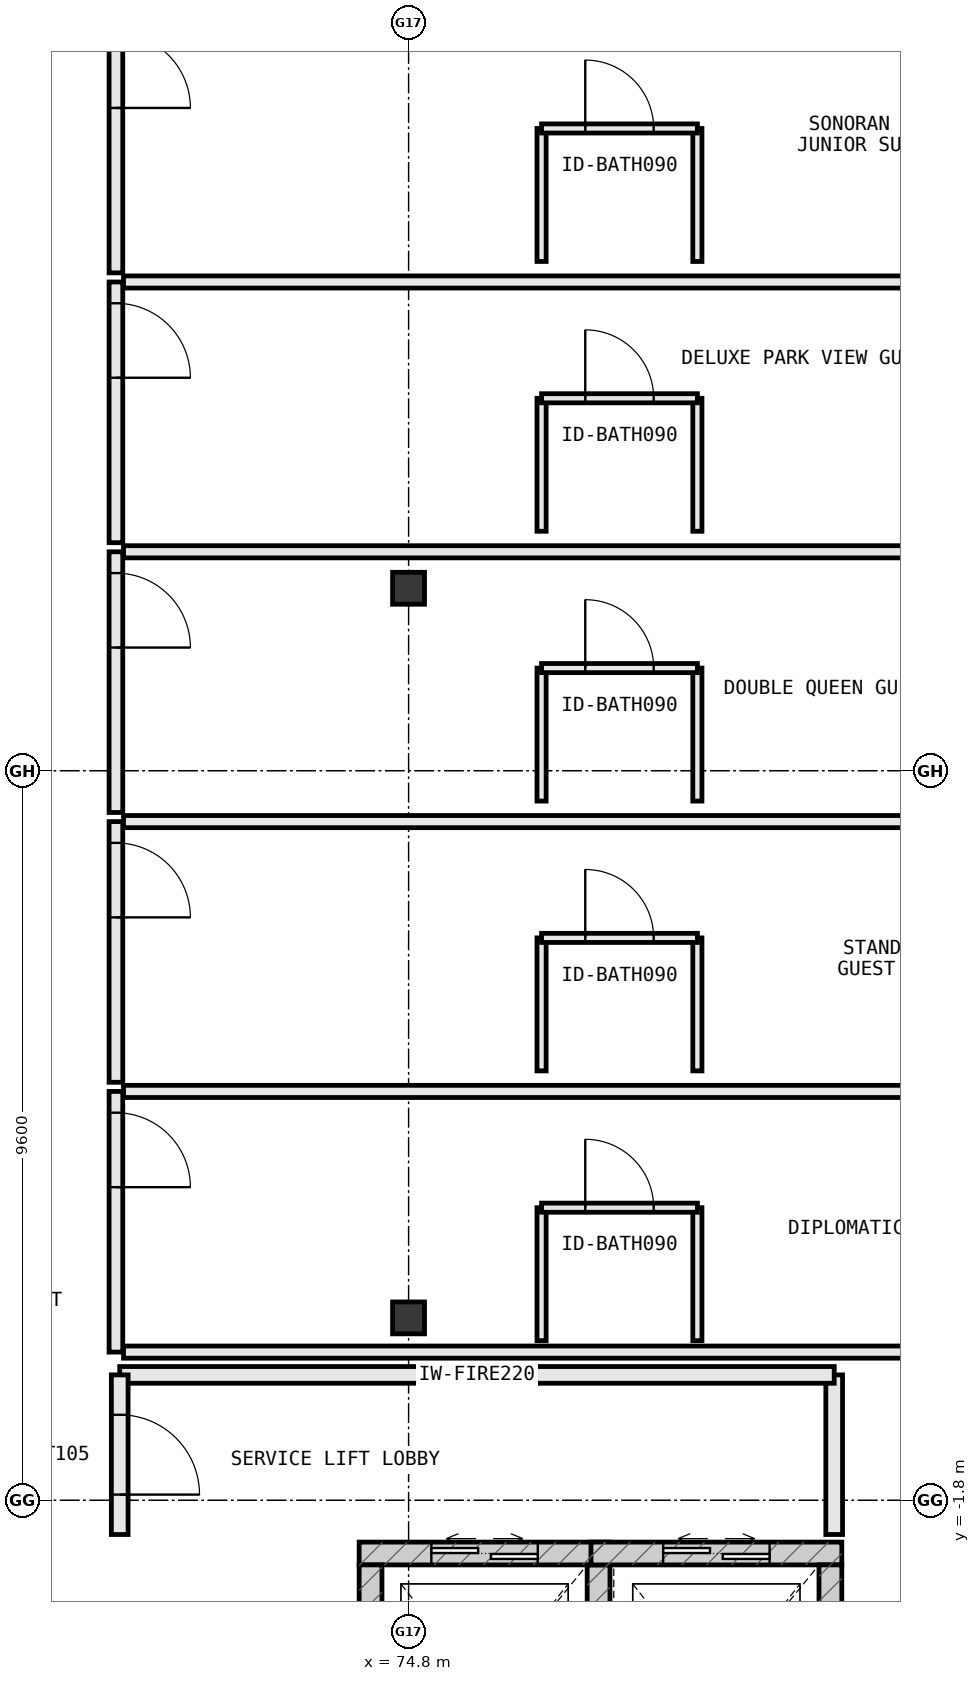
"""IFC4 building model, lengths in metres.
Left out: names, types, materials, properties, quantities, classifications, styles, units other than length and angle.
Written with IfcOpenShell. Run it as: python <this file> out.ifc"""

import sys

from ifc_helpers import new_model, si_unit, direction, frame, frame_2d, origin, origin_2d, place, context, subcontext, project, spatial, rectangle, extrude, element, fill, save


model = new_model("IFC4")
c1 = context("Model", 3, precision=1e-05, world=origin(), true_north=direction((0.0, 1.0)))
c2 = subcontext(c1, "Body", "Model", "MODEL_VIEW")
j1 = project(units=[si_unit("LENGTHUNIT", "METRE"), si_unit("PLANEANGLEUNIT", "RADIAN")], contexts=[c1])
p1 = place(None, origin())
s1 = spatial("IfcSite", under=j1, at=p1, CompositionType="ELEMENT")
p2 = place(p1, origin())
s2 = spatial("IfcBuilding", under=s1, at=p2, CompositionType="ELEMENT")
p3 = place(p2, frame((0.0, 0.0, 42.8)))
s3 = spatial("IfcBuildingStorey", under=s2, at=p3, CompositionType="ELEMENT", Elevation=42.8)
for number, where, z_axis, x_axis in (
    (1, (74.8, 0.6, 0.0), (0.0, 0.0, 1.0), (1.0, 0.0, 0.0)),
    (2, (74.8, 10.2, 0.0), (0.0, 0.0, 1.0), (1.0, 0.0, 0.0)),
):
    element("IfcColumn", number, at=place(p3, frame(where, z_axis=z_axis, x_axis=x_axis)), inside=s3, PredefinedType="COLUMN", context=c2, shape_type="SweptSolid", body=[
        extrude(rectangle(XDim=0.42, YDim=0.42, at=origin_2d()), origin(), (0.0, 0.0, 1.0), 3.8),
    ])
p4 = place(p3, frame((77.45, -2.5, 0.0), z_axis=(0.0, 0.0, 1.0), x_axis=(-1.0, 0.0, 0.0)))
e3 = element("IfcWall", 3, at=p4, inside=s3, PredefinedType="SHEAR", context=c2, shape_type="SweptSolid", body=[
    extrude(rectangle(XDim=3.3, YDim=0.3, at=frame_2d((1.65, 0.0))), origin(), (0.0, 0.0, 1.0), 3.8),
])
p5 = place(p4, frame((0.95, 0.0, 0.0)))
e4 = element("IfcOpeningElement", 4, at=p5, cuts=e3, PredefinedType="OPENING", context=c2, shape_type="SweptSolid", body=[
    extrude(rectangle(XDim=1.4, YDim=2.2, at=frame_2d((0.7, 1.1))), frame((0.0, 0.162, 0.0), z_axis=(0.0, -1.0, 0.0), x_axis=(1.0, 0.0, 0.0)), (0.0, 0.0, 1.0), 0.324),
])
for number, where, z_axis, x_axis in (
    (5, (77.3, -5.95, 0.0), (0.0, 0.0, 1.0), (0.0, 1.0, 0.0)),
    (6, (74.3, -2.65, 0.0), (0.0, 0.0, 1.0), (0.0, -1.0, 0.0)),
):
    element("IfcWall", number, at=place(p3, frame(where, z_axis=z_axis, x_axis=x_axis)), inside=s3, PredefinedType="SHEAR", context=c2, shape_type="SweptSolid", body=[
        extrude(rectangle(XDim=3.3, YDim=0.3, at=frame_2d((1.65, 0.0))), origin(), (0.0, 0.0, 1.0), 3.8),
    ])
p6 = place(p3, frame((80.5, -2.5, 0.0), z_axis=(0.0, 0.0, 1.0), x_axis=(-1.0, 0.0, 0.0)))
e7 = element("IfcWall", 7, at=p6, inside=s3, PredefinedType="SHEAR", context=c2, shape_type="SweptSolid", body=[
    extrude(rectangle(XDim=3.3, YDim=0.3, at=frame_2d((1.65, 0.0))), origin(), (0.0, 0.0, 1.0), 3.8),
])
p7 = place(p6, frame((0.95, 0.0, 0.0)))
e8 = element("IfcOpeningElement", 8, at=p7, cuts=e7, PredefinedType="OPENING", context=c2, shape_type="SweptSolid", body=[
    extrude(rectangle(XDim=1.4, YDim=2.2, at=frame_2d((0.7, 1.1))), frame((0.0, 0.162, 0.0), z_axis=(0.0, -1.0, 0.0), x_axis=(1.0, 0.0, 0.0)), (0.0, 0.0, 1.0), 0.324),
])
p8 = place(p3, frame((80.35, -5.95, 0.0), z_axis=(0.0, 0.0, 1.0), x_axis=(0.0, 1.0, 0.0)))
e9 = element("IfcWall", 9, at=p8, inside=s3, PredefinedType="SHEAR", context=c2, shape_type="SweptSolid", body=[
    extrude(rectangle(XDim=3.3, YDim=0.3, at=frame_2d((1.65, 0.0))), origin(), (0.0, 0.0, 1.0), 3.8),
])
p9 = place(p3, frame((80.4, -2.25, 0.0), z_axis=(0.0, 0.0, 1.0), x_axis=(0.0, 1.0, 0.0)))
e10 = element("IfcWall", 10, at=p9, inside=s3, PredefinedType="STANDARD", context=c2, shape_type="SweptSolid", body=[
    extrude(rectangle(XDim=2.1, YDim=0.22, at=frame_2d((1.05, 0.0))), origin(), (0.0, 0.0, 1.0), 3.54),
])
p10 = place(p3, frame((80.4, -0.15, 0.0), z_axis=(0.0, 0.0, 1.0), x_axis=(-1.0, 0.0, 0.0)))
e11 = element("IfcWall", 11, at=p10, inside=s3, PredefinedType="STANDARD", context=c2, shape_type="SweptSolid", body=[
    extrude(rectangle(XDim=9.4, YDim=0.22, at=frame_2d((4.7, 0.0))), origin(), (0.0, 0.0, 1.0), 3.54),
])
p11 = place(p3, frame((71.0, -0.15, 0.0), z_axis=(0.0, 0.0, 1.0), x_axis=(0.0, -1.0, 0.0)))
e12 = element("IfcWall", 12, at=p11, inside=s3, PredefinedType="STANDARD", context=c2, shape_type="SweptSolid", body=[
    extrude(rectangle(XDim=2.1, YDim=0.22, at=frame_2d((1.05, 0.0))), origin(), (0.0, 0.0, 1.0), 3.54),
])
p12 = place(p11, frame((0.525, 0.0, 0.0)))
e13 = element("IfcOpeningElement", 13, at=p12, cuts=e12, PredefinedType="OPENING", context=c2, shape_type="SweptSolid", body=[
    extrude(rectangle(XDim=1.05, YDim=2.2, at=frame_2d((0.525, 1.1))), frame((0.0, 0.122, 0.0), z_axis=(0.0, -1.0, 0.0), x_axis=(1.0, 0.0, 0.0)), (0.0, 0.0, 1.0), 0.244),
])
p13 = place(p3, frame((70.95, 3.58, 0.0), z_axis=(0.0, 0.0, 1.0), x_axis=(0.0, -1.0, 0.0)))
e14 = element("IfcWall", 14, at=p13, inside=s3, PredefinedType="PARTITIONING", context=c2, shape_type="SweptSolid", body=[
    extrude(rectangle(XDim=3.43, YDim=0.18, at=frame_2d((1.715, 0.0))), origin(), (0.0, 0.0, 1.0), 3.54),
])
p14 = place(p13, frame((0.28, 0.0, 0.0)))
e15 = element("IfcOpeningElement", 15, at=p14, cuts=e14, PredefinedType="OPENING", context=c2, shape_type="SweptSolid", body=[
    extrude(rectangle(XDim=0.98, YDim=2.18, at=frame_2d((0.49, 1.09))), frame((0.0, 0.102, 0.0), z_axis=(0.0, -1.0, 0.0), x_axis=(1.0, 0.0, 0.0)), (0.0, 0.0, 1.0), 0.204),
])
for number, where, z_axis, x_axis in (
    (16, (71.05, 0.15, 0.0), (0.0, 0.0, 1.0), (1.0, 0.0, 0.0)),
    (17, (71.05, 3.58, 0.0), (0.0, 0.0, 1.0), (1.0, 0.0, 0.0)),
):
    element("IfcWall", number, at=place(p3, frame(where, z_axis=z_axis, x_axis=x_axis)), inside=s3, PredefinedType="PARTITIONING", context=c2, shape_type="SweptSolid", body=[
        extrude(rectangle(XDim=12.79, YDim=0.16, at=frame_2d((6.395, 0.0))), origin(), (0.0, 0.0, 1.0), 3.54),
    ])
for number, where, z_axis, x_axis in (
    (18, (76.55, 0.3, 0.0), (0.0, 0.0, 1.0), (0.0, 1.0, 0.0)),
    (19, (78.6, 0.3, 0.0), (0.0, 0.0, 1.0), (0.0, 1.0, 0.0)),
):
    element("IfcWall", number, at=place(p3, frame(where, z_axis=z_axis, x_axis=x_axis)), inside=s3, PredefinedType="PARTITIONING", context=c2, shape_type="SweptSolid", body=[
        extrude(rectangle(XDim=1.75, YDim=0.12, at=frame_2d((0.875, 0.0))), origin(), (0.0, 0.0, 1.0), 3.54),
    ])
p15 = place(p3, frame((76.55, 2.05, 0.0), z_axis=(0.0, 0.0, 1.0), x_axis=(1.0, 0.0, 0.0)))
e20 = element("IfcWall", 20, at=p15, inside=s3, PredefinedType="PARTITIONING", context=c2, shape_type="SweptSolid", body=[
    extrude(rectangle(XDim=2.05, YDim=0.12, at=frame_2d((1.025, 0.0))), origin(), (0.0, 0.0, 1.0), 3.54),
])
p16 = place(p15, frame((0.575, 0.0, 0.0)))
e21 = element("IfcOpeningElement", 21, at=p16, cuts=e20, PredefinedType="OPENING", context=c2, shape_type="SweptSolid", body=[
    extrude(rectangle(XDim=0.9, YDim=2.15, at=frame_2d((0.45, 1.075))), frame((0.0, 0.072, 0.0), z_axis=(0.0, -1.0, 0.0), x_axis=(1.0, 0.0, 0.0)), (0.0, 0.0, 1.0), 0.144),
])
p17 = place(p3, frame((70.95, 7.13, 0.0), z_axis=(0.0, 0.0, 1.0), x_axis=(0.0, -1.0, 0.0)))
e22 = element("IfcWall", 22, at=p17, inside=s3, PredefinedType="PARTITIONING", context=c2, shape_type="SweptSolid", body=[
    extrude(rectangle(XDim=3.43, YDim=0.18, at=frame_2d((1.715, 0.0))), origin(), (0.0, 0.0, 1.0), 3.54),
])
p18 = place(p17, frame((0.28, 0.0, 0.0)))
e23 = element("IfcOpeningElement", 23, at=p18, cuts=e22, PredefinedType="OPENING", context=c2, shape_type="SweptSolid", body=[
    extrude(rectangle(XDim=0.98, YDim=2.18, at=frame_2d((0.49, 1.09))), frame((0.0, 0.102, 0.0), z_axis=(0.0, -1.0, 0.0), x_axis=(1.0, 0.0, 0.0)), (0.0, 0.0, 1.0), 0.204),
])
p19 = place(p3, frame((71.05, 7.13, 0.0), z_axis=(0.0, 0.0, 1.0), x_axis=(1.0, 0.0, 0.0)))
e24 = element("IfcWall", 24, at=p19, inside=s3, PredefinedType="PARTITIONING", context=c2, shape_type="SweptSolid", body=[
    extrude(rectangle(XDim=12.79, YDim=0.16, at=frame_2d((6.395, 0.0))), origin(), (0.0, 0.0, 1.0), 3.54),
])
for number, where, z_axis, x_axis in (
    (25, (76.55, 3.85, 0.0), (0.0, 0.0, 1.0), (0.0, 1.0, 0.0)),
    (26, (78.6, 3.85, 0.0), (0.0, 0.0, 1.0), (0.0, 1.0, 0.0)),
):
    element("IfcWall", number, at=place(p3, frame(where, z_axis=z_axis, x_axis=x_axis)), inside=s3, PredefinedType="PARTITIONING", context=c2, shape_type="SweptSolid", body=[
        extrude(rectangle(XDim=1.75, YDim=0.12, at=frame_2d((0.875, 0.0))), origin(), (0.0, 0.0, 1.0), 3.54),
    ])
p20 = place(p3, frame((76.55, 5.6, 0.0), z_axis=(0.0, 0.0, 1.0), x_axis=(1.0, 0.0, 0.0)))
e27 = element("IfcWall", 27, at=p20, inside=s3, PredefinedType="PARTITIONING", context=c2, shape_type="SweptSolid", body=[
    extrude(rectangle(XDim=2.05, YDim=0.12, at=frame_2d((1.025, 0.0))), origin(), (0.0, 0.0, 1.0), 3.54),
])
p21 = place(p20, frame((0.575, 0.0, 0.0)))
e28 = element("IfcOpeningElement", 28, at=p21, cuts=e27, PredefinedType="OPENING", context=c2, shape_type="SweptSolid", body=[
    extrude(rectangle(XDim=0.9, YDim=2.15, at=frame_2d((0.45, 1.075))), frame((0.0, 0.072, 0.0), z_axis=(0.0, -1.0, 0.0), x_axis=(1.0, 0.0, 0.0)), (0.0, 0.0, 1.0), 0.144),
])
p22 = place(p3, frame((70.95, 10.68, 0.0), z_axis=(0.0, 0.0, 1.0), x_axis=(0.0, -1.0, 0.0)))
e29 = element("IfcWall", 29, at=p22, inside=s3, PredefinedType="PARTITIONING", context=c2, shape_type="SweptSolid", body=[
    extrude(rectangle(XDim=3.43, YDim=0.18, at=frame_2d((1.715, 0.0))), origin(), (0.0, 0.0, 1.0), 3.54),
])
p23 = place(p22, frame((0.28, 0.0, 0.0)))
e30 = element("IfcOpeningElement", 30, at=p23, cuts=e29, PredefinedType="OPENING", context=c2, shape_type="SweptSolid", body=[
    extrude(rectangle(XDim=0.98, YDim=2.18, at=frame_2d((0.49, 1.09))), frame((0.0, 0.102, 0.0), z_axis=(0.0, -1.0, 0.0), x_axis=(1.0, 0.0, 0.0)), (0.0, 0.0, 1.0), 0.204),
])
p24 = place(p3, frame((71.05, 10.68, 0.0), z_axis=(0.0, 0.0, 1.0), x_axis=(1.0, 0.0, 0.0)))
e31 = element("IfcWall", 31, at=p24, inside=s3, PredefinedType="PARTITIONING", context=c2, shape_type="SweptSolid", body=[
    extrude(rectangle(XDim=12.79, YDim=0.16, at=frame_2d((6.395, 0.0))), origin(), (0.0, 0.0, 1.0), 3.54),
])
for number, where, z_axis, x_axis in (
    (32, (76.55, 7.4, 0.0), (0.0, 0.0, 1.0), (0.0, 1.0, 0.0)),
    (33, (78.6, 7.4, 0.0), (0.0, 0.0, 1.0), (0.0, 1.0, 0.0)),
):
    element("IfcWall", number, at=place(p3, frame(where, z_axis=z_axis, x_axis=x_axis)), inside=s3, PredefinedType="PARTITIONING", context=c2, shape_type="SweptSolid", body=[
        extrude(rectangle(XDim=1.75, YDim=0.12, at=frame_2d((0.875, 0.0))), origin(), (0.0, 0.0, 1.0), 3.54),
    ])
p25 = place(p3, frame((76.55, 9.15, 0.0), z_axis=(0.0, 0.0, 1.0), x_axis=(1.0, 0.0, 0.0)))
e34 = element("IfcWall", 34, at=p25, inside=s3, PredefinedType="PARTITIONING", context=c2, shape_type="SweptSolid", body=[
    extrude(rectangle(XDim=2.05, YDim=0.12, at=frame_2d((1.025, 0.0))), origin(), (0.0, 0.0, 1.0), 3.54),
])
p26 = place(p25, frame((0.575, 0.0, 0.0)))
e35 = element("IfcOpeningElement", 35, at=p26, cuts=e34, PredefinedType="OPENING", context=c2, shape_type="SweptSolid", body=[
    extrude(rectangle(XDim=0.9, YDim=2.15, at=frame_2d((0.45, 1.075))), frame((0.0, 0.072, 0.0), z_axis=(0.0, -1.0, 0.0), x_axis=(1.0, 0.0, 0.0)), (0.0, 0.0, 1.0), 0.144),
])
p27 = place(p3, frame((70.95, 14.23, 0.0), z_axis=(0.0, 0.0, 1.0), x_axis=(0.0, -1.0, 0.0)))
e36 = element("IfcWall", 36, at=p27, inside=s3, PredefinedType="PARTITIONING", context=c2, shape_type="SweptSolid", body=[
    extrude(rectangle(XDim=3.43, YDim=0.18, at=frame_2d((1.715, 0.0))), origin(), (0.0, 0.0, 1.0), 3.54),
])
p28 = place(p27, frame((0.28, 0.0, 0.0)))
e37 = element("IfcOpeningElement", 37, at=p28, cuts=e36, PredefinedType="OPENING", context=c2, shape_type="SweptSolid", body=[
    extrude(rectangle(XDim=0.98, YDim=2.18, at=frame_2d((0.49, 1.09))), frame((0.0, 0.102, 0.0), z_axis=(0.0, -1.0, 0.0), x_axis=(1.0, 0.0, 0.0)), (0.0, 0.0, 1.0), 0.204),
])
p29 = place(p3, frame((71.05, 14.23, 0.0), z_axis=(0.0, 0.0, 1.0), x_axis=(1.0, 0.0, 0.0)))
e38 = element("IfcWall", 38, at=p29, inside=s3, PredefinedType="PARTITIONING", context=c2, shape_type="SweptSolid", body=[
    extrude(rectangle(XDim=12.79, YDim=0.16, at=frame_2d((6.395, 0.0))), origin(), (0.0, 0.0, 1.0), 3.54),
])
for number, where, z_axis, x_axis in (
    (39, (76.55, 10.95, 0.0), (0.0, 0.0, 1.0), (0.0, 1.0, 0.0)),
    (40, (78.6, 10.95, 0.0), (0.0, 0.0, 1.0), (0.0, 1.0, 0.0)),
):
    element("IfcWall", number, at=place(p3, frame(where, z_axis=z_axis, x_axis=x_axis)), inside=s3, PredefinedType="PARTITIONING", context=c2, shape_type="SweptSolid", body=[
        extrude(rectangle(XDim=1.75, YDim=0.12, at=frame_2d((0.875, 0.0))), origin(), (0.0, 0.0, 1.0), 3.54),
    ])
p30 = place(p3, frame((76.55, 12.7, 0.0), z_axis=(0.0, 0.0, 1.0), x_axis=(1.0, 0.0, 0.0)))
e41 = element("IfcWall", 41, at=p30, inside=s3, PredefinedType="PARTITIONING", context=c2, shape_type="SweptSolid", body=[
    extrude(rectangle(XDim=2.05, YDim=0.12, at=frame_2d((1.025, 0.0))), origin(), (0.0, 0.0, 1.0), 3.54),
])
p31 = place(p30, frame((0.575, 0.0, 0.0)))
e42 = element("IfcOpeningElement", 42, at=p31, cuts=e41, PredefinedType="OPENING", context=c2, shape_type="SweptSolid", body=[
    extrude(rectangle(XDim=0.9, YDim=2.15, at=frame_2d((0.45, 1.075))), frame((0.0, 0.072, 0.0), z_axis=(0.0, -1.0, 0.0), x_axis=(1.0, 0.0, 0.0)), (0.0, 0.0, 1.0), 0.144),
])
p32 = place(p3, frame((70.95, 17.78, 0.0), z_axis=(0.0, 0.0, 1.0), x_axis=(0.0, -1.0, 0.0)))
e43 = element("IfcWall", 43, at=p32, inside=s3, PredefinedType="PARTITIONING", context=c2, shape_type="SweptSolid", body=[
    extrude(rectangle(XDim=3.43, YDim=0.18, at=frame_2d((1.715, 0.0))), origin(), (0.0, 0.0, 1.0), 3.54),
])
p33 = place(p32, frame((0.28, 0.0, 0.0)))
e44 = element("IfcOpeningElement", 44, at=p33, cuts=e43, PredefinedType="OPENING", context=c2, shape_type="SweptSolid", body=[
    extrude(rectangle(XDim=0.98, YDim=2.18, at=frame_2d((0.49, 1.09))), frame((0.0, 0.102, 0.0), z_axis=(0.0, -1.0, 0.0), x_axis=(1.0, 0.0, 0.0)), (0.0, 0.0, 1.0), 0.204),
])
for number, where, z_axis, x_axis in (
    (45, (76.55, 14.5, 0.0), (0.0, 0.0, 1.0), (0.0, 1.0, 0.0)),
    (46, (78.6, 14.5, 0.0), (0.0, 0.0, 1.0), (0.0, 1.0, 0.0)),
):
    element("IfcWall", number, at=place(p3, frame(where, z_axis=z_axis, x_axis=x_axis)), inside=s3, PredefinedType="PARTITIONING", context=c2, shape_type="SweptSolid", body=[
        extrude(rectangle(XDim=1.75, YDim=0.12, at=frame_2d((0.875, 0.0))), origin(), (0.0, 0.0, 1.0), 3.54),
    ])
p34 = place(p3, frame((76.55, 16.25, 0.0), z_axis=(0.0, 0.0, 1.0), x_axis=(1.0, 0.0, 0.0)))
e47 = element("IfcWall", 47, at=p34, inside=s3, PredefinedType="PARTITIONING", context=c2, shape_type="SweptSolid", body=[
    extrude(rectangle(XDim=2.05, YDim=0.12, at=frame_2d((1.025, 0.0))), origin(), (0.0, 0.0, 1.0), 3.54),
])
p35 = place(p34, frame((0.575, 0.0, 0.0)))
e48 = element("IfcOpeningElement", 48, at=p35, cuts=e47, PredefinedType="OPENING", context=c2, shape_type="SweptSolid", body=[
    extrude(rectangle(XDim=0.9, YDim=2.15, at=frame_2d((0.45, 1.075))), frame((0.0, 0.072, 0.0), z_axis=(0.0, -1.0, 0.0), x_axis=(1.0, 0.0, 0.0)), (0.0, 0.0, 1.0), 0.144),
])
p36 = place(p5, origin())
e49 = element("IfcDoor", 49, at=p36, inside=s3, OperationType="DOUBLE_DOOR_SLIDING", PredefinedType="DOOR", context=c2, shape_type="SweptSolid", body=[
    extrude(rectangle(XDim=1.4, YDim=2.2, at=frame_2d((0.7, 1.1))), frame((0.0, 0.025, 0.0), z_axis=(0.0, -1.0, 0.0), x_axis=(1.0, 0.0, 0.0)), (0.0, 0.0, 1.0), 0.05),
])
fill(e4, e49)
p37 = place(p7, origin())
e50 = element("IfcDoor", 50, at=p37, inside=s3, OperationType="DOUBLE_DOOR_SLIDING", PredefinedType="DOOR", context=c2, shape_type="SweptSolid", body=[
    extrude(rectangle(XDim=1.4, YDim=2.2, at=frame_2d((0.7, 1.1))), frame((0.0, 0.025, 0.0), z_axis=(0.0, -1.0, 0.0), x_axis=(1.0, 0.0, 0.0)), (0.0, 0.0, 1.0), 0.05),
])
fill(e8, e50)
p38 = place(p12, origin())
e51 = element("IfcDoor", 51, at=p38, inside=s3, OperationType="SINGLE_SWING_RIGHT", PredefinedType="DOOR", context=c2, shape_type="SweptSolid", body=[
    extrude(rectangle(XDim=1.05, YDim=2.2, at=frame_2d((0.525, 1.1))), frame((0.0, 0.025, 0.0), z_axis=(0.0, -1.0, 0.0), x_axis=(1.0, 0.0, 0.0)), (0.0, 0.0, 1.0), 0.05),
])
fill(e13, e51)
p39 = place(p14, origin())
e52 = element("IfcDoor", 52, at=p39, inside=s3, OperationType="SINGLE_SWING_RIGHT", PredefinedType="DOOR", context=c2, shape_type="SweptSolid", body=[
    extrude(rectangle(XDim=0.98, YDim=2.18, at=frame_2d((0.49, 1.09))), frame((0.0, 0.025, 0.0), z_axis=(0.0, -1.0, 0.0), x_axis=(1.0, 0.0, 0.0)), (0.0, 0.0, 1.0), 0.05),
])
fill(e15, e52)
p40 = place(p16, origin())
e53 = element("IfcDoor", 53, at=p40, inside=s3, OperationType="SINGLE_SWING_LEFT", PredefinedType="DOOR", context=c2, shape_type="SweptSolid", body=[
    extrude(rectangle(XDim=0.9, YDim=2.15, at=frame_2d((0.45, 1.075))), frame((0.0, 0.025, 0.0), z_axis=(0.0, -1.0, 0.0), x_axis=(1.0, 0.0, 0.0)), (0.0, 0.0, 1.0), 0.05),
])
fill(e21, e53)
p41 = place(p18, origin())
e54 = element("IfcDoor", 54, at=p41, inside=s3, OperationType="SINGLE_SWING_RIGHT", PredefinedType="DOOR", context=c2, shape_type="SweptSolid", body=[
    extrude(rectangle(XDim=0.98, YDim=2.18, at=frame_2d((0.49, 1.09))), frame((0.0, 0.025, 0.0), z_axis=(0.0, -1.0, 0.0), x_axis=(1.0, 0.0, 0.0)), (0.0, 0.0, 1.0), 0.05),
])
fill(e23, e54)
p42 = place(p21, origin())
e55 = element("IfcDoor", 55, at=p42, inside=s3, OperationType="SINGLE_SWING_LEFT", PredefinedType="DOOR", context=c2, shape_type="SweptSolid", body=[
    extrude(rectangle(XDim=0.9, YDim=2.15, at=frame_2d((0.45, 1.075))), frame((0.0, 0.025, 0.0), z_axis=(0.0, -1.0, 0.0), x_axis=(1.0, 0.0, 0.0)), (0.0, 0.0, 1.0), 0.05),
])
fill(e28, e55)
p43 = place(p23, origin())
e56 = element("IfcDoor", 56, at=p43, inside=s3, OperationType="SINGLE_SWING_RIGHT", PredefinedType="DOOR", context=c2, shape_type="SweptSolid", body=[
    extrude(rectangle(XDim=0.98, YDim=2.18, at=frame_2d((0.49, 1.09))), frame((0.0, 0.025, 0.0), z_axis=(0.0, -1.0, 0.0), x_axis=(1.0, 0.0, 0.0)), (0.0, 0.0, 1.0), 0.05),
])
fill(e30, e56)
p44 = place(p26, origin())
e57 = element("IfcDoor", 57, at=p44, inside=s3, OperationType="SINGLE_SWING_LEFT", PredefinedType="DOOR", context=c2, shape_type="SweptSolid", body=[
    extrude(rectangle(XDim=0.9, YDim=2.15, at=frame_2d((0.45, 1.075))), frame((0.0, 0.025, 0.0), z_axis=(0.0, -1.0, 0.0), x_axis=(1.0, 0.0, 0.0)), (0.0, 0.0, 1.0), 0.05),
])
fill(e35, e57)
p45 = place(p28, origin())
e58 = element("IfcDoor", 58, at=p45, inside=s3, OperationType="SINGLE_SWING_RIGHT", PredefinedType="DOOR", context=c2, shape_type="SweptSolid", body=[
    extrude(rectangle(XDim=0.98, YDim=2.18, at=frame_2d((0.49, 1.09))), frame((0.0, 0.025, 0.0), z_axis=(0.0, -1.0, 0.0), x_axis=(1.0, 0.0, 0.0)), (0.0, 0.0, 1.0), 0.05),
])
fill(e37, e58)
p46 = place(p31, origin())
e59 = element("IfcDoor", 59, at=p46, inside=s3, OperationType="SINGLE_SWING_LEFT", PredefinedType="DOOR", context=c2, shape_type="SweptSolid", body=[
    extrude(rectangle(XDim=0.9, YDim=2.15, at=frame_2d((0.45, 1.075))), frame((0.0, 0.025, 0.0), z_axis=(0.0, -1.0, 0.0), x_axis=(1.0, 0.0, 0.0)), (0.0, 0.0, 1.0), 0.05),
])
fill(e42, e59)
p47 = place(p33, origin())
e60 = element("IfcDoor", 60, at=p47, inside=s3, OperationType="SINGLE_SWING_RIGHT", PredefinedType="DOOR", context=c2, shape_type="SweptSolid", body=[
    extrude(rectangle(XDim=0.98, YDim=2.18, at=frame_2d((0.49, 1.09))), frame((0.0, 0.025, 0.0), z_axis=(0.0, -1.0, 0.0), x_axis=(1.0, 0.0, 0.0)), (0.0, 0.0, 1.0), 0.05),
])
fill(e44, e60)
p48 = place(p35, origin())
e61 = element("IfcDoor", 61, at=p48, inside=s3, OperationType="SINGLE_SWING_LEFT", PredefinedType="DOOR", context=c2, shape_type="SweptSolid", body=[
    extrude(rectangle(XDim=0.9, YDim=2.15, at=frame_2d((0.45, 1.075))), frame((0.0, 0.025, 0.0), z_axis=(0.0, -1.0, 0.0), x_axis=(1.0, 0.0, 0.0)), (0.0, 0.0, 1.0), 0.05),
])
fill(e48, e61)
save(model, sys.argv[1])
